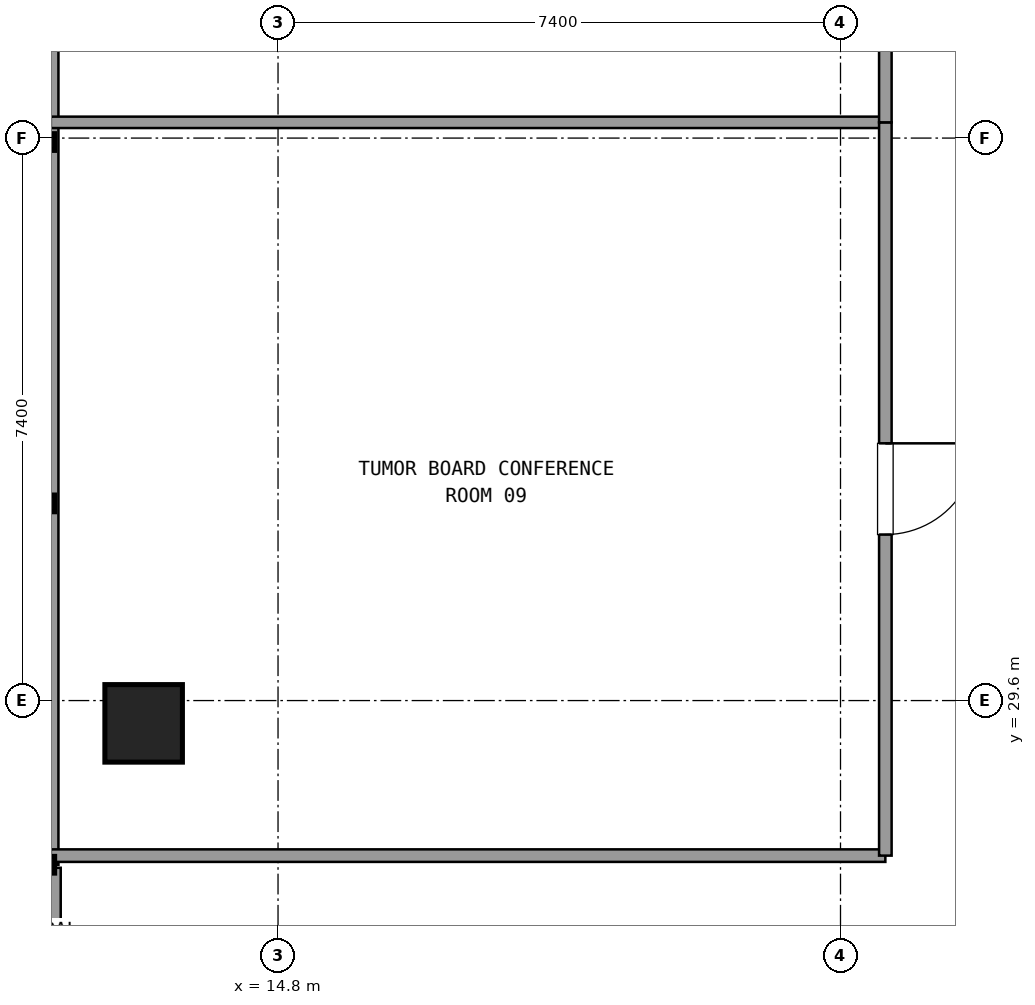
"""IFC4 building model, lengths in metres.
Left out: names, types, materials, properties, quantities, classifications, styles, units other than length and angle.
Written with IfcOpenShell. Run it as: python <this file> out.ifc"""

import sys

from ifc_helpers import new_model, si_unit, direction, frame, frame_2d, origin, origin_2d, place, context, subcontext, project, spatial, rectangle, extrude, element, fill, save


model = new_model("IFC4")
c1 = context("Model", 3, precision=1e-05, world=origin(), true_north=direction((0.0, 1.0)))
c2 = subcontext(c1, "Body", "Model", "MODEL_VIEW")
j1 = project(units=[si_unit("LENGTHUNIT", "METRE"), si_unit("PLANEANGLEUNIT", "RADIAN")], contexts=[c1])
p1 = place(None, origin())
s1 = spatial("IfcSite", under=j1, at=p1, CompositionType="ELEMENT")
p2 = place(p1, origin())
s2 = spatial("IfcBuilding", under=s1, at=p2, CompositionType="ELEMENT")
p3 = place(p2, frame((0.0, 0.0, 106.38)))
s3 = spatial("IfcBuildingStorey", under=s2, at=p3, CompositionType="ELEMENT", Elevation=106.38)
p4 = place(p3, frame((13.032, 29.3, 0.021), z_axis=(0.084573087246, 0.0, 0.99641727851), x_axis=(0.0, 1.0, 0.0)))
e1 = element("IfcColumn", 1, at=p4, inside=s3, PredefinedType="COLUMN", context=c2, shape_type="SweptSolid", body=[
    extrude(rectangle(XDim=1.02, YDim=1.02, at=origin_2d()), origin(), (0.0, 0.0, 1.0), 3.571),
])
p5 = place(p3, frame((11.791, 27.4, 0.0), z_axis=(0.0, 0.0, 1.0), x_axis=(0.0, -1.0, 0.0)))
e2 = element("IfcWall", 2, at=p5, inside=s3, PredefinedType="SOLIDWALL", context=c2, shape_type="SweptSolid", body=[
    extrude(rectangle(XDim=3.0, YDim=0.3, at=frame_2d((1.5, 0.0))), origin(), (0.0, 0.0, 1.0), 2.67),
])
p6 = place(p5, frame((0.9, 0.0, 0.0)))
e3 = element("IfcOpeningElement", 3, at=p6, cuts=e2, PredefinedType="OPENING", context=c2, shape_type="SweptSolid", body=[
    extrude(rectangle(XDim=1.2, YDim=2.2, at=frame_2d((0.6, 1.1))), frame((0.0, 0.16, 0.0), z_axis=(0.0, -1.0, 0.0), x_axis=(1.0, 0.0, 0.0)), (0.0, 0.0, 1.0), 0.32),
])
p7 = place(p3, frame((11.791, 41.702, 0.0), z_axis=(0.0, 0.0, 1.0), x_axis=(0.0, -1.0, 0.0)))
e4 = element("IfcWall", 4, at=p7, inside=s3, PredefinedType="SOLIDWALL", context=c2, shape_type="SweptSolid", body=[
    extrude(rectangle(XDim=14.262, YDim=0.24, at=frame_2d((7.131, 0.0))), origin(), (0.0, 0.0, 1.0), 0.85),
])
p8 = place(p3, frame((11.811, 27.56, 0.0), z_axis=(0.0, 0.0, 1.0), x_axis=(1.0, 0.0, 0.0)))
e5 = element("IfcWall", 5, at=p8, inside=s3, PredefinedType="PARTITIONING", context=c2, shape_type="SweptSolid", body=[
    extrude(rectangle(XDim=10.979, YDim=0.165, at=frame_2d((5.49, 0.0))), origin(), (0.0, 0.0, 1.0), 2.61),
])
p9 = place(p3, frame((22.79, 37.207, 0.0), z_axis=(0.0, 0.0, 1.0), x_axis=(-1.0, 0.0, 0.0)))
e6 = element("IfcWall", 6, at=p9, inside=s3, PredefinedType="PARTITIONING", context=c2, shape_type="SweptSolid", body=[
    extrude(rectangle(XDim=10.979, YDim=0.15, at=frame_2d((5.49, 0.0))), origin(), (0.0, 0.0, 1.0), 2.61),
])
p10 = place(p3, frame((22.79, 27.56, 0.0), z_axis=(0.0, 0.0, 1.0), x_axis=(0.0, 1.0, 0.0)))
e7 = element("IfcWall", 7, at=p10, inside=s3, PredefinedType="PARTITIONING", context=c2, shape_type="SweptSolid", body=[
    extrude(rectangle(XDim=9.647, YDim=0.165, at=frame_2d((4.823, 0.0))), origin(), (0.0, 0.0, 1.0), 2.61),
])
p11 = place(p10, frame((4.224, 0.0, 0.0)))
e8 = element("IfcOpeningElement", 8, at=p11, cuts=e7, PredefinedType="OPENING", context=c2, shape_type="SweptSolid", body=[
    extrude(rectangle(XDim=1.2, YDim=2.15, at=frame_2d((0.6, 1.075))), frame((0.0, 0.093, 0.0), z_axis=(0.0, -1.0, 0.0), x_axis=(1.0, 0.0, 0.0)), (0.0, 0.0, 1.0), 0.185),
])
p12 = place(p3, frame((22.79, 37.207, 0.0), z_axis=(0.0, 0.0, 1.0), x_axis=(0.0, 1.0, 0.0)))
e9 = element("IfcWall", 9, at=p12, inside=s3, PredefinedType="PARTITIONING", context=c2, shape_type="SweptSolid", body=[
    extrude(rectangle(XDim=10.45, YDim=0.165, at=frame_2d((5.225, 0.0))), origin(), (0.0, 0.0, 1.0), 2.61),
])
p13 = place(p12, frame((4.625, 0.0, 0.0)))
e10 = element("IfcOpeningElement", 10, at=p13, cuts=e9, PredefinedType="OPENING", context=c2, shape_type="SweptSolid", body=[
    extrude(rectangle(XDim=1.2, YDim=2.15, at=frame_2d((0.6, 1.075))), frame((0.0, 0.093, 0.0), z_axis=(0.0, -1.0, 0.0), x_axis=(1.0, 0.0, 0.0)), (0.0, 0.0, 1.0), 0.185),
])
p14 = place(p11, frame((1.2, 0.0, 0.0), z_axis=(0.0, 0.0, 1.0), x_axis=(-1.0, 0.0, 0.0)))
e11 = element("IfcDoor", 11, at=p14, inside=s3, OperationType="SINGLE_SWING_RIGHT", PredefinedType="DOOR", context=c2, shape_type="SweptSolid", body=[
    extrude(rectangle(XDim=1.2, YDim=2.15, at=frame_2d((0.6, 1.075))), frame((0.0, 0.025, 0.0), z_axis=(0.0, -1.0, 0.0), x_axis=(1.0, 0.0, 0.0)), (0.0, 0.0, 1.0), 0.05),
])
fill(e8, e11)
save(model, sys.argv[1])
